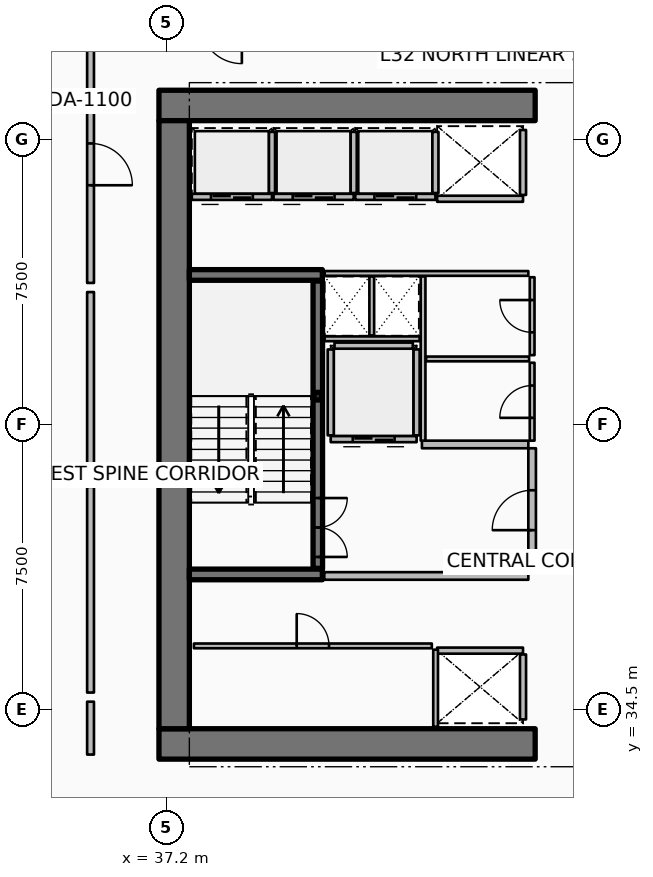
"""IFC4 building model, lengths in metres.
Left out: names, types, materials, properties, quantities, classifications, styles, units other than length and angle.
Written with IfcOpenShell. Run it as: python <this file> out.ifc"""

import sys

from ifc_helpers import new_model, si_unit, direction, frame, frame_2d, origin, origin_2d, place, context, subcontext, project, spatial, rectangle, hollow_rectangle, extrude, element, fill, save


model = new_model("IFC4")
c1 = context("Model", 3, precision=1e-05, world=origin(), true_north=direction((0.0, 1.0)))
c2 = subcontext(c1, "Body", "Model", "MODEL_VIEW")
j1 = project(units=[si_unit("LENGTHUNIT", "METRE"), si_unit("PLANEANGLEUNIT", "RADIAN")], contexts=[c1])
p1 = place(None, origin())
s1 = spatial("IfcSite", under=j1, at=p1, CompositionType="ELEMENT")
p2 = place(p1, origin())
s2 = spatial("IfcBuilding", under=s1, at=p2, CompositionType="ELEMENT")
p3 = place(p2, frame((0.0, 0.0, 131.55)))
s3 = spatial("IfcBuildingStorey", under=s2, at=p3, CompositionType="ELEMENT", Elevation=131.55)
for number, where, z_axis, x_axis in (
    (1, (37.0, 33.6, 0.0), (0.0, 0.0, 1.0), (1.0, 0.0, 0.0)),
    (2, (37.0, 50.4, 0.0), (0.0, 0.0, 1.0), (1.0, 0.0, 0.0)),
):
    element("IfcWall", number, at=place(p3, frame(where, z_axis=z_axis, x_axis=x_axis)), inside=s3, PredefinedType="SHEAR", context=c2, shape_type="SweptSolid", body=[
        extrude(rectangle(XDim=9.9, YDim=0.8, at=frame_2d((4.95, 0.0))), origin(), (0.0, 0.0, 1.0), 3.75),
    ])
p4 = place(p3, frame((37.4, 34.0, 0.0), z_axis=(0.0, 0.0, 1.0), x_axis=(0.0, 1.0, 0.0)))
e3 = element("IfcWall", 3, at=p4, inside=s3, PredefinedType="SHEAR", context=c2, shape_type="SweptSolid", body=[
    extrude(rectangle(XDim=16.0, YDim=0.8, at=frame_2d((8.0, 0.0))), origin(), (0.0, 0.0, 1.0), 3.75),
])
for number, where, z_axis, x_axis in (
    (4, (37.8, 38.06, 0.0), (0.0, 0.0, 1.0), (1.0, 0.0, 0.0)),
    (5, (37.8, 45.94, 0.0), (0.0, 0.0, 1.0), (1.0, 0.0, 0.0)),
):
    element("IfcWall", number, at=place(p3, frame(where, z_axis=z_axis, x_axis=x_axis)), inside=s3, PredefinedType="SHEAR", context=c2, shape_type="SweptSolid", body=[
        extrude(rectangle(XDim=3.5, YDim=0.28, at=frame_2d((1.75, 0.0))), origin(), (0.0, 0.0, 1.0), 3.75),
    ])
p5 = place(p3, frame((41.18, 42.75, 0.0), z_axis=(0.0, 0.0, 1.0), x_axis=(1.0, 0.0, 0.0)))
e6 = element("IfcColumn", 6, at=p5, inside=s3, PredefinedType="COLUMN", context=c2, shape_type="SweptSolid", body=[
    extrude(hollow_rectangle(XDim=0.2, YDim=0.2, WallThickness=0.01, InnerFilletRadius=0.01, OuterFilletRadius=0.02, at=origin_2d()), origin(), (0.0, 0.0, 1.0), 1.67),
])
p6 = place(p3, frame((41.18, 38.22, 0.0), z_axis=(0.0, 0.0, 1.0), x_axis=(0.0, 1.0, 0.0)))
e7 = element("IfcWall", 7, at=p6, inside=s3, PredefinedType="SOLIDWALL", context=c2, shape_type="SweptSolid", body=[
    extrude(rectangle(XDim=7.56, YDim=0.25, at=frame_2d((3.78, 0.0))), origin(), (0.0, 0.0, 1.0), 3.5),
])
p7 = place(p6, frame((0.3, 0.0, 0.0)))
e8 = element("IfcOpeningElement", 8, at=p7, cuts=e7, PredefinedType="OPENING", context=c2, shape_type="SweptSolid", body=[
    extrude(rectangle(XDim=1.55, YDim=2.15, at=frame_2d((0.775, 1.075))), frame((0.0, 0.135, 0.0), z_axis=(0.0, -1.0, 0.0), x_axis=(1.0, 0.0, 0.0)), (0.0, 0.0, 1.0), 0.27),
])
p8 = place(p3, frame((39.975, 47.995, 0.0), z_axis=(0.0, 0.0, 1.0), x_axis=(-1.0, 0.0, 0.0)))
e9 = element("IfcWall", 9, at=p8, inside=s3, PredefinedType="PARTITIONING", context=c2, shape_type="SweptSolid", body=[
    extrude(rectangle(XDim=2.11, YDim=0.16, at=frame_2d((1.055, 0.0))), origin(), (0.0, 0.0, 1.0), 3.5),
])
p9 = place(p8, frame((0.505, 0.0, 0.0)))
e10 = element("IfcOpeningElement", 10, at=p9, cuts=e9, PredefinedType="OPENING", context=c2, shape_type="SweptSolid", body=[
    extrude(rectangle(XDim=1.1, YDim=2.1, at=frame_2d((0.55, 1.05))), frame((0.0, 0.09, 0.0), z_axis=(0.0, -1.0, 0.0), x_axis=(1.0, 0.0, 0.0)), (0.0, 0.0, 1.0), 0.18),
])
p10 = place(p3, frame((39.975, 48.095, 0.0), z_axis=(0.0, 0.0, 1.0), x_axis=(0.0, 1.0, 0.0)))
e11 = element("IfcWall", 11, at=p10, inside=s3, PredefinedType="PARTITIONING", context=c2, shape_type="SweptSolid", body=[
    extrude(rectangle(XDim=1.61, YDim=0.16, at=frame_2d((0.805, 0.0))), origin(), (0.0, 0.0, 1.0), 3.5),
])
p11 = place(p3, frame((42.125, 47.995, 0.0), z_axis=(0.0, 0.0, 1.0), x_axis=(-1.0, 0.0, 0.0)))
e12 = element("IfcWall", 12, at=p11, inside=s3, PredefinedType="PARTITIONING", context=c2, shape_type="SweptSolid", body=[
    extrude(rectangle(XDim=2.11, YDim=0.16, at=frame_2d((1.055, 0.0))), origin(), (0.0, 0.0, 1.0), 3.5),
])
p12 = place(p11, frame((0.505, 0.0, 0.0)))
e13 = element("IfcOpeningElement", 13, at=p12, cuts=e12, PredefinedType="OPENING", context=c2, shape_type="SweptSolid", body=[
    extrude(rectangle(XDim=1.1, YDim=2.1, at=frame_2d((0.55, 1.05))), frame((0.0, 0.09, 0.0), z_axis=(0.0, -1.0, 0.0), x_axis=(1.0, 0.0, 0.0)), (0.0, 0.0, 1.0), 0.18),
])
p13 = place(p3, frame((42.125, 48.095, 0.0), z_axis=(0.0, 0.0, 1.0), x_axis=(0.0, 1.0, 0.0)))
e14 = element("IfcWall", 14, at=p13, inside=s3, PredefinedType="PARTITIONING", context=c2, shape_type="SweptSolid", body=[
    extrude(rectangle(XDim=1.61, YDim=0.16, at=frame_2d((0.805, 0.0))), origin(), (0.0, 0.0, 1.0), 3.5),
])
p14 = place(p3, frame((44.275, 47.995, 0.0), z_axis=(0.0, 0.0, 1.0), x_axis=(-1.0, 0.0, 0.0)))
e15 = element("IfcWall", 15, at=p14, inside=s3, PredefinedType="PARTITIONING", context=c2, shape_type="SweptSolid", body=[
    extrude(rectangle(XDim=2.11, YDim=0.16, at=frame_2d((1.055, 0.0))), origin(), (0.0, 0.0, 1.0), 3.5),
])
p15 = place(p14, frame((0.505, 0.0, 0.0)))
e16 = element("IfcOpeningElement", 16, at=p15, cuts=e15, PredefinedType="OPENING", context=c2, shape_type="SweptSolid", body=[
    extrude(rectangle(XDim=1.1, YDim=2.1, at=frame_2d((0.55, 1.05))), frame((0.0, 0.09, 0.0), z_axis=(0.0, -1.0, 0.0), x_axis=(1.0, 0.0, 0.0)), (0.0, 0.0, 1.0), 0.18),
])
p16 = place(p3, frame((44.275, 48.095, 0.0), z_axis=(0.0, 0.0, 1.0), x_axis=(0.0, 1.0, 0.0)))
e17 = element("IfcWall", 17, at=p16, inside=s3, PredefinedType="PARTITIONING", context=c2, shape_type="SweptSolid", body=[
    extrude(rectangle(XDim=1.61, YDim=0.16, at=frame_2d((0.805, 0.0))), origin(), (0.0, 0.0, 1.0), 3.5),
])
p17 = place(p3, frame((46.58, 47.945, 0.0), z_axis=(0.0, 0.0, 1.0), x_axis=(-1.0, 0.0, 0.0)))
e18 = element("IfcWall", 18, at=p17, inside=s3, PredefinedType="PARTITIONING", context=c2, shape_type="SweptSolid", body=[
    extrude(rectangle(XDim=2.26, YDim=0.16, at=frame_2d((1.13, 0.0))), origin(), (0.0, 0.0, 1.0), 3.5),
])
p18 = place(p3, frame((46.58, 48.045, 0.0), z_axis=(0.0, 0.0, 1.0), x_axis=(0.0, 1.0, 0.0)))
e19 = element("IfcWall", 19, at=p18, inside=s3, PredefinedType="PARTITIONING", context=c2, shape_type="SweptSolid", body=[
    extrude(rectangle(XDim=1.71, YDim=0.16, at=frame_2d((0.855, 0.0))), origin(), (0.0, 0.0, 1.0), 3.5),
])
p19 = place(p3, frame((44.32, 36.055, 0.0), z_axis=(0.0, 0.0, 1.0), x_axis=(1.0, 0.0, 0.0)))
e20 = element("IfcWall", 20, at=p19, inside=s3, PredefinedType="PARTITIONING", context=c2, shape_type="SweptSolid", body=[
    extrude(rectangle(XDim=2.26, YDim=0.16, at=frame_2d((1.13, 0.0))), origin(), (0.0, 0.0, 1.0), 3.5),
])
p20 = place(p3, frame((46.58, 34.245, 0.0), z_axis=(0.0, 0.0, 1.0), x_axis=(0.0, 1.0, 0.0)))
e21 = element("IfcWall", 21, at=p20, inside=s3, PredefinedType="PARTITIONING", context=c2, shape_type="SweptSolid", body=[
    extrude(rectangle(XDim=1.71, YDim=0.16, at=frame_2d((0.855, 0.0))), origin(), (0.0, 0.0, 1.0), 3.5),
])
p21 = place(p3, frame((43.78, 41.62, 0.0), z_axis=(0.0, 0.0, 1.0), x_axis=(-1.0, 0.0, 0.0)))
e22 = element("IfcWall", 22, at=p21, inside=s3, PredefinedType="PARTITIONING", context=c2, shape_type="SweptSolid", body=[
    extrude(rectangle(XDim=2.26, YDim=0.16, at=frame_2d((1.13, 0.0))), origin(), (0.0, 0.0, 1.0), 3.5),
])
p22 = place(p21, frame((0.58, 0.0, 0.0)))
e23 = element("IfcOpeningElement", 23, at=p22, cuts=e22, PredefinedType="OPENING", context=c2, shape_type="SweptSolid", body=[
    extrude(rectangle(XDim=1.1, YDim=2.1, at=frame_2d((0.55, 1.05))), frame((0.0, 0.09, 0.0), z_axis=(0.0, -1.0, 0.0), x_axis=(1.0, 0.0, 0.0)), (0.0, 0.0, 1.0), 0.18),
])
for number, where, z_axis, x_axis in (
    (24, (43.78, 41.72, 0.0), (0.0, 0.0, 1.0), (0.0, 1.0, 0.0)),
    (25, (41.52, 41.72, 0.0), (0.0, 0.0, 1.0), (0.0, 1.0, 0.0)),
):
    element("IfcWall", number, at=place(p3, frame(where, z_axis=z_axis, x_axis=x_axis)), inside=s3, PredefinedType="PARTITIONING", context=c2, shape_type="SweptSolid", body=[
        extrude(rectangle(XDim=2.26, YDim=0.16, at=frame_2d((1.13, 0.0))), origin(), (0.0, 0.0, 1.0), 3.5),
    ])
p23 = place(p3, frame((41.62, 44.08, 0.0), z_axis=(0.0, 0.0, 1.0), x_axis=(1.0, 0.0, 0.0)))
e26 = element("IfcWall", 26, at=p23, inside=s3, PredefinedType="PARTITIONING", context=c2, shape_type="SweptSolid", body=[
    extrude(rectangle(XDim=2.06, YDim=0.16, at=frame_2d((1.03, 0.0))), origin(), (0.0, 0.0, 1.0), 3.5),
])
p24 = place(p3, frame((44.28, 34.05, 0.0), z_axis=(0.0, 0.0, 1.0), x_axis=(0.0, 1.0, 0.0)))
e27 = element("IfcWall", 27, at=p24, inside=s3, PredefinedType="PARTITIONING", context=c2, shape_type="SweptSolid", body=[
    extrude(rectangle(XDim=2.03, YDim=0.125, at=frame_2d((1.015, 0.0))), origin(), (0.0, 0.0, 1.0), 2.94),
])
p25 = place(p3, frame((37.92, 36.18, 0.0), z_axis=(0.0, 0.0, 1.0), x_axis=(1.0, 0.0, 0.0)))
e28 = element("IfcWall", 28, at=p25, inside=s3, PredefinedType="PARTITIONING", context=c2, shape_type="SweptSolid", body=[
    extrude(rectangle(XDim=6.26, YDim=0.125, at=frame_2d((3.13, 0.0))), origin(), (0.0, 0.0, 1.0), 2.94),
])
p26 = place(p25, frame((2.705, 0.0, 0.0)))
e29 = element("IfcOpeningElement", 29, at=p26, cuts=e28, PredefinedType="OPENING", context=c2, shape_type="SweptSolid", body=[
    extrude(rectangle(XDim=0.85, YDim=2.06, at=frame_2d((0.425, 1.03))), frame((0.0, 0.073, 0.0), z_axis=(0.0, -1.0, 0.0), x_axis=(1.0, 0.0, 0.0)), (0.0, 0.0, 1.0), 0.145),
])
p27 = place(p3, frame((41.35, 38.02, 0.0), z_axis=(0.0, 0.0, 1.0), x_axis=(1.0, 0.0, 0.0)))
e30 = element("IfcWall", 30, at=p27, inside=s3, PredefinedType="PARTITIONING", context=c2, shape_type="SweptSolid", body=[
    extrude(rectangle(XDim=5.37, YDim=0.2, at=frame_2d((2.685, 0.0))), origin(), (0.0, 0.0, 1.0), 3.5),
])
p28 = place(p3, frame((43.92, 41.48, 0.0), z_axis=(0.0, 0.0, 1.0), x_axis=(1.0, 0.0, 0.0)))
e31 = element("IfcWall", 31, at=p28, inside=s3, PredefinedType="PARTITIONING", context=c2, shape_type="SweptSolid", body=[
    extrude(rectangle(XDim=2.8, YDim=0.2, at=frame_2d((1.4, 0.0))), origin(), (0.0, 0.0, 1.0), 3.5),
])
p29 = place(p3, frame((46.82, 38.12, 0.0), z_axis=(0.0, 0.0, 1.0), x_axis=(0.0, 1.0, 0.0)))
e32 = element("IfcWall", 32, at=p29, inside=s3, PredefinedType="PARTITIONING", context=c2, shape_type="SweptSolid", body=[
    extrude(rectangle(XDim=3.26, YDim=0.2, at=frame_2d((1.63, 0.0))), origin(), (0.0, 0.0, 1.0), 3.5),
])
p30 = place(p29, frame((1.105, 0.0, 0.0)))
e33 = element("IfcOpeningElement", 33, at=p30, cuts=e32, PredefinedType="OPENING", context=c2, shape_type="SweptSolid", body=[
    extrude(rectangle(XDim=1.05, YDim=2.1, at=frame_2d((0.525, 1.05))), frame((0.0, 0.11, 0.0), z_axis=(0.0, -1.0, 0.0), x_axis=(1.0, 0.0, 0.0)), (0.0, 0.0, 1.0), 0.22),
])
p31 = place(p3, frame((41.36, 45.98, 0.0), z_axis=(0.0, 0.0, 1.0), x_axis=(1.0, 0.0, 0.0)))
e34 = element("IfcWall", 34, at=p31, inside=s3, PredefinedType="PARTITIONING", context=c2, shape_type="SweptSolid", body=[
    extrude(rectangle(XDim=5.36, YDim=0.125, at=frame_2d((2.68, 0.0))), origin(), (0.0, 0.0, 1.0), 2.94),
])
p32 = place(p3, frame((41.36, 44.26, 0.0), z_axis=(0.0, 0.0, 1.0), x_axis=(1.0, 0.0, 0.0)))
e35 = element("IfcWall", 35, at=p32, inside=s3, PredefinedType="PARTITIONING", context=c2, shape_type="SweptSolid", body=[
    extrude(rectangle(XDim=2.5, YDim=0.125, at=frame_2d((1.25, 0.0))), origin(), (0.0, 0.0, 1.0), 2.94),
])
p33 = place(p3, frame((42.6, 44.35, 0.0), z_axis=(0.0, 0.0, 1.0), x_axis=(0.0, 1.0, 0.0)))
e36 = element("IfcWall", 36, at=p33, inside=s3, PredefinedType="PARTITIONING", context=c2, shape_type="SweptSolid", body=[
    extrude(rectangle(XDim=1.55, YDim=0.125, at=frame_2d((0.775, 0.0))), origin(), (0.0, 0.0, 1.0), 2.94),
])
p34 = place(p3, frame((43.95, 41.58, 0.0), z_axis=(0.0, 0.0, 1.0), x_axis=(0.0, 1.0, 0.0)))
e37 = element("IfcWall", 37, at=p34, inside=s3, PredefinedType="PARTITIONING", context=c2, shape_type="SweptSolid", body=[
    extrude(rectangle(XDim=4.32, YDim=0.125, at=frame_2d((2.16, 0.0))), origin(), (0.0, 0.0, 1.0), 2.94),
])
p35 = place(p3, frame((44.03, 43.73, 0.0), z_axis=(0.0, 0.0, 1.0), x_axis=(1.0, 0.0, 0.0)))
e38 = element("IfcWall", 38, at=p35, inside=s3, PredefinedType="PARTITIONING", context=c2, shape_type="SweptSolid", body=[
    extrude(rectangle(XDim=2.71, YDim=0.125, at=frame_2d((1.355, 0.0))), origin(), (0.0, 0.0, 1.0), 2.94),
])
p36 = place(p3, frame((46.82, 41.58, 0.0), z_axis=(0.0, 0.0, 1.0), x_axis=(0.0, 1.0, 0.0)))
e39 = element("IfcWall", 39, at=p36, inside=s3, PredefinedType="PARTITIONING", context=c2, shape_type="SweptSolid", body=[
    extrude(rectangle(XDim=2.05, YDim=0.125, at=frame_2d((1.025, 0.0))), origin(), (0.0, 0.0, 1.0), 2.94),
])
p37 = place(p36, frame((0.6, 0.0, 0.0)))
e40 = element("IfcOpeningElement", 40, at=p37, cuts=e39, PredefinedType="OPENING", context=c2, shape_type="SweptSolid", body=[
    extrude(rectangle(XDim=0.85, YDim=2.06, at=frame_2d((0.425, 1.03))), frame((0.0, 0.073, 0.0), z_axis=(0.0, -1.0, 0.0), x_axis=(1.0, 0.0, 0.0)), (0.0, 0.0, 1.0), 0.145),
])
p38 = place(p3, frame((46.82, 43.83, 0.0), z_axis=(0.0, 0.0, 1.0), x_axis=(0.0, 1.0, 0.0)))
e41 = element("IfcWall", 41, at=p38, inside=s3, PredefinedType="PARTITIONING", context=c2, shape_type="SweptSolid", body=[
    extrude(rectangle(XDim=2.05, YDim=0.125, at=frame_2d((1.025, 0.0))), origin(), (0.0, 0.0, 1.0), 2.94),
])
p39 = place(p38, frame((0.6, 0.0, 0.0)))
e42 = element("IfcOpeningElement", 42, at=p39, cuts=e41, PredefinedType="OPENING", context=c2, shape_type="SweptSolid", body=[
    extrude(rectangle(XDim=0.85, YDim=2.06, at=frame_2d((0.425, 1.03))), frame((0.0, 0.073, 0.0), z_axis=(0.0, -1.0, 0.0), x_axis=(1.0, 0.0, 0.0)), (0.0, 0.0, 1.0), 0.145),
])
p40 = place(p3, frame((35.2, 51.971, 0.0), z_axis=(0.0, 0.0, 1.0), x_axis=(0.0, -1.0, 0.0)))
e43 = element("IfcWall", 43, at=p40, inside=s3, PredefinedType="PARTITIONING", context=c2, shape_type="SweptSolid", body=[
    extrude(rectangle(XDim=6.241, YDim=0.18, at=frame_2d((3.12, 0.0))), origin(), (0.0, 0.0, 1.0), 2.94),
])
p41 = place(p40, frame((2.57, 0.0, 0.0)))
e44 = element("IfcOpeningElement", 44, at=p41, cuts=e43, PredefinedType="OPENING", context=c2, shape_type="SweptSolid", body=[
    extrude(rectangle(XDim=1.1, YDim=2.1, at=frame_2d((0.55, 1.05))), frame((0.0, 0.1, 0.0), z_axis=(0.0, -1.0, 0.0), x_axis=(1.0, 0.0, 0.0)), (0.0, 0.0, 1.0), 0.2),
])
p42 = place(p3, frame((35.2, 45.49, 0.0), z_axis=(0.0, 0.0, 1.0), x_axis=(0.0, -1.0, 0.0)))
e45 = element("IfcWall", 45, at=p42, inside=s3, PredefinedType="PARTITIONING", context=c2, shape_type="SweptSolid", body=[
    extrude(rectangle(XDim=4.885, YDim=0.18, at=frame_2d((2.442, 0.0))), origin(), (0.0, 0.0, 1.0), 2.94),
])
p43 = place(p3, frame((35.2, 40.365, 0.0), z_axis=(0.0, 0.0, 1.0), x_axis=(0.0, -1.0, 0.0)))
e46 = element("IfcWall", 46, at=p43, inside=s3, PredefinedType="PARTITIONING", context=c2, shape_type="SweptSolid", body=[
    extrude(rectangle(XDim=5.413, YDim=0.18, at=frame_2d((2.707, 0.0))), origin(), (0.0, 0.0, 1.0), 2.94),
])
p44 = place(p3, frame((35.2, 34.712, 0.0), z_axis=(0.0, 0.0, 1.0), x_axis=(0.0, -1.0, 0.0)))
e47 = element("IfcWall", 47, at=p44, inside=s3, PredefinedType="PARTITIONING", context=c2, shape_type="SweptSolid", body=[
    extrude(rectangle(XDim=1.392, YDim=0.18, at=frame_2d((0.696, 0.0))), origin(), (0.0, 0.0, 1.0), 2.94),
])
p45 = place(p7, origin())
e48 = element("IfcDoor", 48, at=p45, inside=s3, OperationType="DOUBLE_DOOR_SINGLE_SWING", PredefinedType="DOOR", context=c2, shape_type="SweptSolid", body=[
    extrude(rectangle(XDim=1.55, YDim=2.15, at=frame_2d((0.775, 1.075))), frame((0.0, 0.025, 0.0), z_axis=(0.0, -1.0, 0.0), x_axis=(1.0, 0.0, 0.0)), (0.0, 0.0, 1.0), 0.05),
])
fill(e8, e48)
p46 = place(p9, origin())
e49 = element("IfcDoor", 49, at=p46, inside=s3, OperationType="DOUBLE_DOOR_SLIDING", PredefinedType="DOOR", context=c2, shape_type="SweptSolid", body=[
    extrude(rectangle(XDim=1.1, YDim=2.1, at=frame_2d((0.55, 1.05))), frame((0.0, 0.025, 0.0), z_axis=(0.0, -1.0, 0.0), x_axis=(1.0, 0.0, 0.0)), (0.0, 0.0, 1.0), 0.05),
])
fill(e10, e49)
p47 = place(p12, origin())
e50 = element("IfcDoor", 50, at=p47, inside=s3, OperationType="DOUBLE_DOOR_SLIDING", PredefinedType="DOOR", context=c2, shape_type="SweptSolid", body=[
    extrude(rectangle(XDim=1.1, YDim=2.1, at=frame_2d((0.55, 1.05))), frame((0.0, 0.025, 0.0), z_axis=(0.0, -1.0, 0.0), x_axis=(1.0, 0.0, 0.0)), (0.0, 0.0, 1.0), 0.05),
])
fill(e13, e50)
p48 = place(p15, origin())
e51 = element("IfcDoor", 51, at=p48, inside=s3, OperationType="DOUBLE_DOOR_SLIDING", PredefinedType="DOOR", context=c2, shape_type="SweptSolid", body=[
    extrude(rectangle(XDim=1.1, YDim=2.1, at=frame_2d((0.55, 1.05))), frame((0.0, 0.025, 0.0), z_axis=(0.0, -1.0, 0.0), x_axis=(1.0, 0.0, 0.0)), (0.0, 0.0, 1.0), 0.05),
])
fill(e16, e51)
p49 = place(p22, origin())
e52 = element("IfcDoor", 52, at=p49, inside=s3, OperationType="DOUBLE_DOOR_SLIDING", PredefinedType="DOOR", context=c2, shape_type="SweptSolid", body=[
    extrude(rectangle(XDim=1.1, YDim=2.1, at=frame_2d((0.55, 1.05))), frame((0.0, 0.025, 0.0), z_axis=(0.0, -1.0, 0.0), x_axis=(1.0, 0.0, 0.0)), (0.0, 0.0, 1.0), 0.05),
])
fill(e23, e52)
p50 = place(p26, origin())
e53 = element("IfcDoor", 53, at=p50, inside=s3, OperationType="SINGLE_SWING_LEFT", PredefinedType="DOOR", context=c2, shape_type="SweptSolid", body=[
    extrude(rectangle(XDim=0.85, YDim=2.06, at=frame_2d((0.425, 1.03))), frame((0.0, 0.025, 0.0), z_axis=(0.0, -1.0, 0.0), x_axis=(1.0, 0.0, 0.0)), (0.0, 0.0, 1.0), 0.05),
])
fill(e29, e53)
p51 = place(p30, origin())
e54 = element("IfcDoor", 54, at=p51, inside=s3, OperationType="SINGLE_SWING_LEFT", PredefinedType="DOOR", context=c2, shape_type="SweptSolid", body=[
    extrude(rectangle(XDim=1.05, YDim=2.1, at=frame_2d((0.525, 1.05))), frame((0.0, 0.025, 0.0), z_axis=(0.0, -1.0, 0.0), x_axis=(1.0, 0.0, 0.0)), (0.0, 0.0, 1.0), 0.05),
])
fill(e33, e54)
p52 = place(p37, origin())
e55 = element("IfcDoor", 55, at=p52, inside=s3, OperationType="SINGLE_SWING_LEFT", PredefinedType="DOOR", context=c2, shape_type="SweptSolid", body=[
    extrude(rectangle(XDim=0.85, YDim=2.06, at=frame_2d((0.425, 1.03))), frame((0.0, 0.025, 0.0), z_axis=(0.0, -1.0, 0.0), x_axis=(1.0, 0.0, 0.0)), (0.0, 0.0, 1.0), 0.05),
])
fill(e40, e55)
p53 = place(p39, origin())
e56 = element("IfcDoor", 56, at=p53, inside=s3, OperationType="SINGLE_SWING_RIGHT", PredefinedType="DOOR", context=c2, shape_type="SweptSolid", body=[
    extrude(rectangle(XDim=0.85, YDim=2.06, at=frame_2d((0.425, 1.03))), frame((0.0, 0.025, 0.0), z_axis=(0.0, -1.0, 0.0), x_axis=(1.0, 0.0, 0.0)), (0.0, 0.0, 1.0), 0.05),
])
fill(e42, e56)
p54 = place(p41, origin())
e57 = element("IfcDoor", 57, at=p54, inside=s3, OperationType="SINGLE_SWING_RIGHT", PredefinedType="DOOR", context=c2, shape_type="SweptSolid", body=[
    extrude(rectangle(XDim=1.1, YDim=2.1, at=frame_2d((0.55, 1.05))), frame((0.0, 0.025, 0.0), z_axis=(0.0, -1.0, 0.0), x_axis=(1.0, 0.0, 0.0)), (0.0, 0.0, 1.0), 0.05),
])
fill(e44, e57)
save(model, sys.argv[1])
